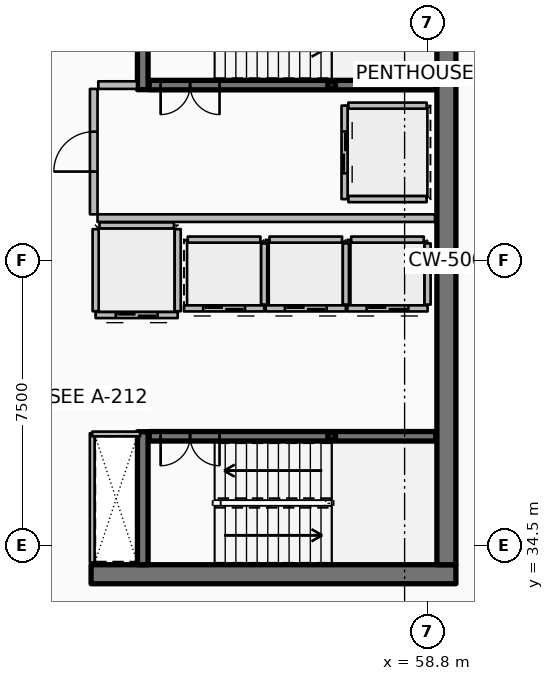
"""IFC4 building model, lengths in metres.
Left out: names, types, materials, properties, quantities, classifications, styles, units other than length and angle.
Written with IfcOpenShell. Run it as: python <this file> out.ifc"""

import sys

from ifc_helpers import new_model, si_unit, direction, frame, frame_2d, origin, origin_2d, place, context, subcontext, project, spatial, rectangle, hollow_rectangle, extrude, element, fill, save


model = new_model("IFC4")
c1 = context("Model", 3, precision=1e-05, world=origin(), true_north=direction((0.0, 1.0)))
c2 = subcontext(c1, "Body", "Model", "MODEL_VIEW")
j1 = project(units=[si_unit("LENGTHUNIT", "METRE"), si_unit("PLANEANGLEUNIT", "RADIAN")], contexts=[c1])
p1 = place(None, origin())
s1 = spatial("IfcSite", under=j1, at=p1, CompositionType="ELEMENT")
p2 = place(p1, origin())
s2 = spatial("IfcBuilding", under=s1, at=p2, CompositionType="ELEMENT")
p3 = place(p2, frame((0.0, 0.0, 347.3)))
s3 = spatial("IfcBuildingStorey", under=s2, at=p3, CompositionType="ELEMENT", Elevation=347.3)
p4 = place(p3, frame((49.95, 33.75, 0.0), z_axis=(0.0, 0.0, 1.0), x_axis=(1.0, 0.0, 0.0)))
e1 = element("IfcWall", 1, at=p4, inside=s3, PredefinedType="SHEAR", context=c2, shape_type="SweptSolid", body=[
    extrude(rectangle(XDim=9.6, YDim=0.5, at=frame_2d((4.8, 0.0))), origin(), (0.0, 0.0, 1.0), 4.2),
])
p5 = place(p3, frame((59.3, 34.0, 0.0), z_axis=(0.0, 0.0, 1.0), x_axis=(0.0, 1.0, 0.0)))
e2 = element("IfcWall", 2, at=p5, inside=s3, PredefinedType="SHEAR", context=c2, shape_type="SweptSolid", body=[
    extrude(rectangle(XDim=16.0, YDim=0.5, at=frame_2d((8.0, 0.0))), origin(), (0.0, 0.0, 1.0), 4.2),
])
for number, where, z_axis, x_axis in (
    (3, (51.31, 46.5, 0.0), (0.0, 0.0, 1.0), (0.0, 1.0, 0.0)),
    (4, (51.31, 34.0, 0.0), (0.0, 0.0, 1.0), (0.0, 1.0, 0.0)),
):
    element("IfcWall", number, at=place(p3, frame(where, z_axis=z_axis, x_axis=x_axis)), inside=s3, PredefinedType="SHEAR", context=c2, shape_type="SweptSolid", body=[
        extrude(rectangle(XDim=3.5, YDim=0.28, at=frame_2d((1.75, 0.0))), origin(), (0.0, 0.0, 1.0), 4.2),
    ])
for number, where, z_axis, x_axis in (
    (5, (56.28, 46.62, 0.0), (0.0, 0.0, 1.0), (1.0, 0.0, 0.0)),
    (6, (56.28, 37.38, 0.0), (0.0, 0.0, 1.0), (1.0, 0.0, 0.0)),
):
    element("IfcColumn", number, at=place(p3, frame(where, z_axis=z_axis, x_axis=x_axis)), inside=s3, PredefinedType="COLUMN", context=c2, shape_type="SweptSolid", body=[
        extrude(hollow_rectangle(XDim=0.2, YDim=0.2, WallThickness=0.01, InnerFilletRadius=0.01, OuterFilletRadius=0.02, at=origin_2d()), origin(), (0.0, 0.0, 1.0), 1.895),
    ])
p6 = place(p3, frame((51.48, 46.62, 0.0), z_axis=(0.0, 0.0, 1.0), x_axis=(1.0, 0.0, 0.0)))
e7 = element("IfcWall", 7, at=p6, inside=s3, PredefinedType="SOLIDWALL", context=c2, shape_type="SweptSolid", body=[
    extrude(rectangle(XDim=7.54, YDim=0.25, at=frame_2d((3.77, 0.0))), origin(), (0.0, 0.0, 1.0), 3.8),
])
p7 = place(p6, frame((0.3, 0.0, 0.0)))
e8 = element("IfcOpeningElement", 8, at=p7, cuts=e7, PredefinedType="OPENING", context=c2, shape_type="SweptSolid", body=[
    extrude(rectangle(XDim=1.55, YDim=2.15, at=frame_2d((0.775, 1.075))), frame((0.0, 0.135, 0.0), z_axis=(0.0, -1.0, 0.0), x_axis=(1.0, 0.0, 0.0)), (0.0, 0.0, 1.0), 0.27),
])
p8 = place(p3, frame((51.48, 37.38, 0.0), z_axis=(0.0, 0.0, 1.0), x_axis=(1.0, 0.0, 0.0)))
e9 = element("IfcWall", 9, at=p8, inside=s3, PredefinedType="SOLIDWALL", context=c2, shape_type="SweptSolid", body=[
    extrude(rectangle(XDim=7.54, YDim=0.25, at=frame_2d((3.77, 0.0))), origin(), (0.0, 0.0, 1.0), 3.8),
])
p9 = place(p8, frame((0.3, 0.0, 0.0)))
e10 = element("IfcOpeningElement", 10, at=p9, cuts=e9, PredefinedType="OPENING", context=c2, shape_type="SweptSolid", body=[
    extrude(rectangle(XDim=1.55, YDim=2.15, at=frame_2d((0.775, 1.075))), frame((0.0, 0.135, 0.0), z_axis=(0.0, -1.0, 0.0), x_axis=(1.0, 0.0, 0.0)), (0.0, 0.0, 1.0), 0.27),
])
p10 = place(p3, frame((54.505, 40.745, 0.0), z_axis=(0.0, 0.0, 1.0), x_axis=(-1.0, 0.0, 0.0)))
e11 = element("IfcWall", 11, at=p10, inside=s3, PredefinedType="PARTITIONING", context=c2, shape_type="SweptSolid", body=[
    extrude(rectangle(XDim=2.11, YDim=0.16, at=frame_2d((1.055, 0.0))), origin(), (0.0, 0.0, 1.0), 3.8),
])
p11 = place(p10, frame((0.505, 0.0, 0.0)))
e12 = element("IfcOpeningElement", 12, at=p11, cuts=e11, PredefinedType="OPENING", context=c2, shape_type="SweptSolid", body=[
    extrude(rectangle(XDim=1.1, YDim=2.1, at=frame_2d((0.55, 1.05))), frame((0.0, 0.09, 0.0), z_axis=(0.0, -1.0, 0.0), x_axis=(1.0, 0.0, 0.0)), (0.0, 0.0, 1.0), 0.18),
])
p12 = place(p3, frame((54.505, 40.845, 0.0), z_axis=(0.0, 0.0, 1.0), x_axis=(0.0, 1.0, 0.0)))
e13 = element("IfcWall", 13, at=p12, inside=s3, PredefinedType="PARTITIONING", context=c2, shape_type="SweptSolid", body=[
    extrude(rectangle(XDim=1.61, YDim=0.16, at=frame_2d((0.805, 0.0))), origin(), (0.0, 0.0, 1.0), 3.8),
])
p13 = place(p3, frame((52.495, 42.555, 0.0), z_axis=(0.0, 0.0, 1.0), x_axis=(1.0, 0.0, 0.0)))
e14 = element("IfcWall", 14, at=p13, inside=s3, PredefinedType="PARTITIONING", context=c2, shape_type="SweptSolid", body=[
    extrude(rectangle(XDim=1.91, YDim=0.16, at=frame_2d((0.955, 0.0))), origin(), (0.0, 0.0, 1.0), 3.8),
])
p14 = place(p3, frame((56.655, 40.745, 0.0), z_axis=(0.0, 0.0, 1.0), x_axis=(-1.0, 0.0, 0.0)))
e15 = element("IfcWall", 15, at=p14, inside=s3, PredefinedType="PARTITIONING", context=c2, shape_type="SweptSolid", body=[
    extrude(rectangle(XDim=2.11, YDim=0.16, at=frame_2d((1.055, 0.0))), origin(), (0.0, 0.0, 1.0), 3.8),
])
p15 = place(p14, frame((0.505, 0.0, 0.0)))
e16 = element("IfcOpeningElement", 16, at=p15, cuts=e15, PredefinedType="OPENING", context=c2, shape_type="SweptSolid", body=[
    extrude(rectangle(XDim=1.1, YDim=2.1, at=frame_2d((0.55, 1.05))), frame((0.0, 0.09, 0.0), z_axis=(0.0, -1.0, 0.0), x_axis=(1.0, 0.0, 0.0)), (0.0, 0.0, 1.0), 0.18),
])
p16 = place(p3, frame((56.655, 40.845, 0.0), z_axis=(0.0, 0.0, 1.0), x_axis=(0.0, 1.0, 0.0)))
e17 = element("IfcWall", 17, at=p16, inside=s3, PredefinedType="PARTITIONING", context=c2, shape_type="SweptSolid", body=[
    extrude(rectangle(XDim=1.61, YDim=0.16, at=frame_2d((0.805, 0.0))), origin(), (0.0, 0.0, 1.0), 3.8),
])
p17 = place(p3, frame((54.645, 42.555, 0.0), z_axis=(0.0, 0.0, 1.0), x_axis=(1.0, 0.0, 0.0)))
e18 = element("IfcWall", 18, at=p17, inside=s3, PredefinedType="PARTITIONING", context=c2, shape_type="SweptSolid", body=[
    extrude(rectangle(XDim=1.91, YDim=0.16, at=frame_2d((0.955, 0.0))), origin(), (0.0, 0.0, 1.0), 3.8),
])
p18 = place(p3, frame((58.805, 40.745, 0.0), z_axis=(0.0, 0.0, 1.0), x_axis=(-1.0, 0.0, 0.0)))
e19 = element("IfcWall", 19, at=p18, inside=s3, PredefinedType="PARTITIONING", context=c2, shape_type="SweptSolid", body=[
    extrude(rectangle(XDim=2.11, YDim=0.16, at=frame_2d((1.055, 0.0))), origin(), (0.0, 0.0, 1.0), 3.8),
])
p19 = place(p18, frame((0.505, 0.0, 0.0)))
e20 = element("IfcOpeningElement", 20, at=p19, cuts=e19, PredefinedType="OPENING", context=c2, shape_type="SweptSolid", body=[
    extrude(rectangle(XDim=1.1, YDim=2.1, at=frame_2d((0.55, 1.05))), frame((0.0, 0.09, 0.0), z_axis=(0.0, -1.0, 0.0), x_axis=(1.0, 0.0, 0.0)), (0.0, 0.0, 1.0), 0.18),
])
p20 = place(p3, frame((58.805, 40.845, 0.0), z_axis=(0.0, 0.0, 1.0), x_axis=(0.0, 1.0, 0.0)))
e21 = element("IfcWall", 21, at=p20, inside=s3, PredefinedType="PARTITIONING", context=c2, shape_type="SweptSolid", body=[
    extrude(rectangle(XDim=1.61, YDim=0.16, at=frame_2d((0.805, 0.0))), origin(), (0.0, 0.0, 1.0), 3.8),
])
p21 = place(p3, frame((56.795, 42.555, 0.0), z_axis=(0.0, 0.0, 1.0), x_axis=(1.0, 0.0, 0.0)))
e22 = element("IfcWall", 22, at=p21, inside=s3, PredefinedType="PARTITIONING", context=c2, shape_type="SweptSolid", body=[
    extrude(rectangle(XDim=1.91, YDim=0.16, at=frame_2d((0.955, 0.0))), origin(), (0.0, 0.0, 1.0), 3.8),
])
p22 = place(p3, frame((56.62, 46.08, 0.0), z_axis=(0.0, 0.0, 1.0), x_axis=(0.0, -1.0, 0.0)))
e23 = element("IfcWall", 23, at=p22, inside=s3, PredefinedType="PARTITIONING", context=c2, shape_type="SweptSolid", body=[
    extrude(rectangle(XDim=2.46, YDim=0.16, at=frame_2d((1.23, 0.0))), origin(), (0.0, 0.0, 1.0), 3.8),
])
p23 = place(p22, frame((0.68, 0.0, 0.0)))
e24 = element("IfcOpeningElement", 24, at=p23, cuts=e23, PredefinedType="OPENING", context=c2, shape_type="SweptSolid", body=[
    extrude(rectangle(XDim=1.1, YDim=2.1, at=frame_2d((0.55, 1.05))), frame((0.0, 0.09, 0.0), z_axis=(0.0, -1.0, 0.0), x_axis=(1.0, 0.0, 0.0)), (0.0, 0.0, 1.0), 0.18),
])
for number, where, z_axis, x_axis in (
    (25, (56.72, 46.08, 0.0), (0.0, 0.0, 1.0), (1.0, 0.0, 0.0)),
    (26, (56.72, 43.62, 0.0), (0.0, 0.0, 1.0), (1.0, 0.0, 0.0)),
):
    element("IfcWall", number, at=place(p3, frame(where, z_axis=z_axis, x_axis=x_axis)), inside=s3, PredefinedType="PARTITIONING", context=c2, shape_type="SweptSolid", body=[
        extrude(rectangle(XDim=2.06, YDim=0.16, at=frame_2d((1.03, 0.0))), origin(), (0.0, 0.0, 1.0), 3.8),
    ])
p24 = place(p3, frame((52.23, 40.57, 0.0), z_axis=(0.0, 0.0, 1.0), x_axis=(-1.0, 0.0, 0.0)))
e27 = element("IfcWall", 27, at=p24, inside=s3, PredefinedType="PARTITIONING", context=c2, shape_type="SweptSolid", body=[
    extrude(rectangle(XDim=2.16, YDim=0.16, at=frame_2d((1.08, 0.0))), origin(), (0.0, 0.0, 1.0), 3.8),
])
p25 = place(p24, frame((0.53, 0.0, 0.0)))
e28 = element("IfcOpeningElement", 28, at=p25, cuts=e27, PredefinedType="OPENING", context=c2, shape_type="SweptSolid", body=[
    extrude(rectangle(XDim=1.1, YDim=2.1, at=frame_2d((0.55, 1.05))), frame((0.0, 0.09, 0.0), z_axis=(0.0, -1.0, 0.0), x_axis=(1.0, 0.0, 0.0)), (0.0, 0.0, 1.0), 0.18),
])
for number, where, z_axis, x_axis in (
    (29, (52.23, 40.67, 0.0), (0.0, 0.0, 1.0), (0.0, 1.0, 0.0)),
    (30, (50.07, 40.67, 0.0), (0.0, 0.0, 1.0), (0.0, 1.0, 0.0)),
):
    element("IfcWall", number, at=place(p3, frame(where, z_axis=z_axis, x_axis=x_axis)), inside=s3, PredefinedType="PARTITIONING", context=c2, shape_type="SweptSolid", body=[
        extrude(rectangle(XDim=2.16, YDim=0.16, at=frame_2d((1.08, 0.0))), origin(), (0.0, 0.0, 1.0), 3.8),
    ])
p26 = place(p3, frame((50.17, 42.93, 0.0), z_axis=(0.0, 0.0, 1.0), x_axis=(1.0, 0.0, 0.0)))
e31 = element("IfcWall", 31, at=p26, inside=s3, PredefinedType="PARTITIONING", context=c2, shape_type="SweptSolid", body=[
    extrude(rectangle(XDim=1.96, YDim=0.16, at=frame_2d((0.98, 0.0))), origin(), (0.0, 0.0, 1.0), 3.8),
])
p27 = place(p3, frame((50.12, 43.12, 0.0), z_axis=(0.0, 0.0, 1.0), x_axis=(1.0, 0.0, 0.0)))
e32 = element("IfcWall", 32, at=p27, inside=s3, PredefinedType="PARTITIONING", context=c2, shape_type="SweptSolid", body=[
    extrude(rectangle(XDim=8.88, YDim=0.2, at=frame_2d((4.44, 0.0))), origin(), (0.0, 0.0, 1.0), 3.8),
])
p28 = place(p3, frame((50.14, 46.62, 0.0), z_axis=(0.0, 0.0, 1.0), x_axis=(1.0, 0.0, 0.0)))
e33 = element("IfcWall", 33, at=p28, inside=s3, PredefinedType="PARTITIONING", context=c2, shape_type="SweptSolid", body=[
    extrude(rectangle(XDim=1.02, YDim=0.2, at=frame_2d((0.51, 0.0))), origin(), (0.0, 0.0, 1.0), 3.8),
])
p29 = place(p3, frame((50.02, 43.22, 0.0), z_axis=(0.0, 0.0, 1.0), x_axis=(0.0, 1.0, 0.0)))
e34 = element("IfcWall", 34, at=p29, inside=s3, PredefinedType="PARTITIONING", context=c2, shape_type="SweptSolid", body=[
    extrude(rectangle(XDim=3.3, YDim=0.2, at=frame_2d((1.65, 0.0))), origin(), (0.0, 0.0, 1.0), 3.8),
])
p30 = place(p29, frame((1.125, 0.0, 0.0)))
e35 = element("IfcOpeningElement", 35, at=p30, cuts=e34, PredefinedType="OPENING", context=c2, shape_type="SweptSolid", body=[
    extrude(rectangle(XDim=1.05, YDim=2.1, at=frame_2d((0.525, 1.05))), frame((0.0, 0.11, 0.0), z_axis=(0.0, -1.0, 0.0), x_axis=(1.0, 0.0, 0.0)), (0.0, 0.0, 1.0), 0.22),
])
p31 = place(p3, frame((49.98, 34.06, 0.0), z_axis=(0.0, 0.0, 1.0), x_axis=(0.0, 1.0, 0.0)))
e36 = element("IfcWall", 36, at=p31, inside=s3, PredefinedType="PARTITIONING", context=c2, shape_type="SweptSolid", body=[
    extrude(rectangle(XDim=3.4, YDim=0.125, at=frame_2d((1.7, 0.0))), origin(), (0.0, 0.0, 1.0), 3.24),
])
p32 = place(p3, frame((49.98, 37.44, 0.0), z_axis=(0.0, 0.0, 1.0), x_axis=(1.0, 0.0, 0.0)))
e37 = element("IfcWall", 37, at=p32, inside=s3, PredefinedType="PARTITIONING", context=c2, shape_type="SweptSolid", body=[
    extrude(rectangle(XDim=1.26, YDim=0.125, at=frame_2d((0.63, 0.0))), origin(), (0.0, 0.0, 1.0), 3.24),
])
p33 = place(p7, origin())
e38 = element("IfcDoor", 38, at=p33, inside=s3, OperationType="DOUBLE_DOOR_SINGLE_SWING", PredefinedType="DOOR", context=c2, shape_type="SweptSolid", body=[
    extrude(rectangle(XDim=1.55, YDim=2.15, at=frame_2d((0.775, 1.075))), frame((0.0, 0.025, 0.0), z_axis=(0.0, -1.0, 0.0), x_axis=(1.0, 0.0, 0.0)), (0.0, 0.0, 1.0), 0.05),
])
fill(e8, e38)
p34 = place(p9, origin())
e39 = element("IfcDoor", 39, at=p34, inside=s3, OperationType="DOUBLE_DOOR_SINGLE_SWING", PredefinedType="DOOR", context=c2, shape_type="SweptSolid", body=[
    extrude(rectangle(XDim=1.55, YDim=2.15, at=frame_2d((0.775, 1.075))), frame((0.0, 0.025, 0.0), z_axis=(0.0, -1.0, 0.0), x_axis=(1.0, 0.0, 0.0)), (0.0, 0.0, 1.0), 0.05),
])
fill(e10, e39)
p35 = place(p11, origin())
e40 = element("IfcDoor", 40, at=p35, inside=s3, OperationType="DOUBLE_DOOR_SLIDING", PredefinedType="DOOR", context=c2, shape_type="SweptSolid", body=[
    extrude(rectangle(XDim=1.1, YDim=2.1, at=frame_2d((0.55, 1.05))), frame((0.0, 0.025, 0.0), z_axis=(0.0, -1.0, 0.0), x_axis=(1.0, 0.0, 0.0)), (0.0, 0.0, 1.0), 0.05),
])
fill(e12, e40)
p36 = place(p15, origin())
e41 = element("IfcDoor", 41, at=p36, inside=s3, OperationType="DOUBLE_DOOR_SLIDING", PredefinedType="DOOR", context=c2, shape_type="SweptSolid", body=[
    extrude(rectangle(XDim=1.1, YDim=2.1, at=frame_2d((0.55, 1.05))), frame((0.0, 0.025, 0.0), z_axis=(0.0, -1.0, 0.0), x_axis=(1.0, 0.0, 0.0)), (0.0, 0.0, 1.0), 0.05),
])
fill(e16, e41)
p37 = place(p19, origin())
e42 = element("IfcDoor", 42, at=p37, inside=s3, OperationType="DOUBLE_DOOR_SLIDING", PredefinedType="DOOR", context=c2, shape_type="SweptSolid", body=[
    extrude(rectangle(XDim=1.1, YDim=2.1, at=frame_2d((0.55, 1.05))), frame((0.0, 0.025, 0.0), z_axis=(0.0, -1.0, 0.0), x_axis=(1.0, 0.0, 0.0)), (0.0, 0.0, 1.0), 0.05),
])
fill(e20, e42)
p38 = place(p23, origin())
e43 = element("IfcDoor", 43, at=p38, inside=s3, OperationType="DOUBLE_DOOR_SLIDING", PredefinedType="DOOR", context=c2, shape_type="SweptSolid", body=[
    extrude(rectangle(XDim=1.1, YDim=2.1, at=frame_2d((0.55, 1.05))), frame((0.0, 0.025, 0.0), z_axis=(0.0, -1.0, 0.0), x_axis=(1.0, 0.0, 0.0)), (0.0, 0.0, 1.0), 0.05),
])
fill(e24, e43)
p39 = place(p25, origin())
e44 = element("IfcDoor", 44, at=p39, inside=s3, OperationType="DOUBLE_DOOR_SLIDING", PredefinedType="DOOR", context=c2, shape_type="SweptSolid", body=[
    extrude(rectangle(XDim=1.1, YDim=2.1, at=frame_2d((0.55, 1.05))), frame((0.0, 0.025, 0.0), z_axis=(0.0, -1.0, 0.0), x_axis=(1.0, 0.0, 0.0)), (0.0, 0.0, 1.0), 0.05),
])
fill(e28, e44)
p40 = place(p30, origin())
e45 = element("IfcDoor", 45, at=p40, inside=s3, OperationType="SINGLE_SWING_LEFT", PredefinedType="DOOR", context=c2, shape_type="SweptSolid", body=[
    extrude(rectangle(XDim=1.05, YDim=2.1, at=frame_2d((0.525, 1.05))), frame((0.0, 0.025, 0.0), z_axis=(0.0, -1.0, 0.0), x_axis=(1.0, 0.0, 0.0)), (0.0, 0.0, 1.0), 0.05),
])
fill(e35, e45)
save(model, sys.argv[1])
